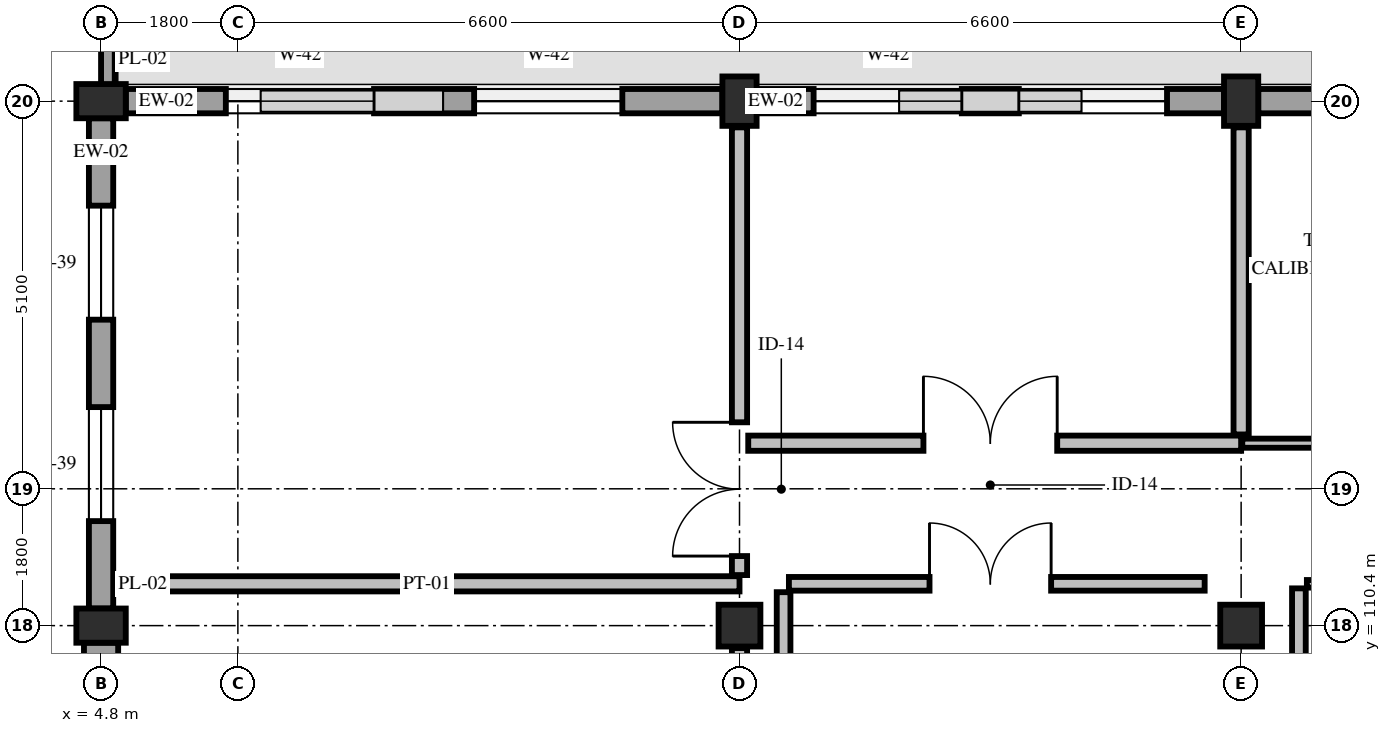
"""IFC4 building model, lengths in metres.
Left out: names, types, materials, properties, quantities, classifications, styles, units other than length and angle.
Written with IfcOpenShell. Run it as: python <this file> out.ifc"""

import sys

from ifc_helpers import new_model, si_unit, direction, frame, frame_2d, origin, origin_2d, place, context, subcontext, project, spatial, rectangle, extrude, element, fill, save


model = new_model("IFC4")
c1 = context("Model", 3, precision=1e-05, world=origin(), true_north=direction((0.0, 1.0)))
c2 = subcontext(c1, "Body", "Model", "MODEL_VIEW")
j1 = project(units=[si_unit("LENGTHUNIT", "METRE"), si_unit("PLANEANGLEUNIT", "RADIAN")], contexts=[c1])
p1 = place(None, origin())
s1 = spatial("IfcSite", under=j1, at=p1, CompositionType="ELEMENT")
p2 = place(p1, origin())
s2 = spatial("IfcBuilding", under=s1, at=p2, CompositionType="ELEMENT")
p3 = place(p2, frame((0.0, 0.0, 46.8)))
s3 = spatial("IfcBuildingStorey", under=s2, at=p3, CompositionType="ELEMENT", Elevation=46.8)
for number, where, z_axis, x_axis in (
    (1, (4.8, 110.4, 0.0), (0.0, 0.0, 1.0), (0.0, 1.0, 0.0)),
    (2, (4.8, 117.3, 0.0), (0.0, 0.0, 1.0), (0.0, 1.0, 0.0)),
):
    element("IfcColumn", number, at=place(p3, frame(where, z_axis=z_axis, x_axis=x_axis)), inside=s3, PredefinedType="PILASTER", context=c2, shape_type="SweptSolid", body=[
        extrude(rectangle(XDim=0.45, YDim=0.65, at=origin_2d()), origin(), (0.0, 0.0, 1.0), 4.2),
    ])
p4 = place(p3, frame((13.2, 110.4, 0.0), z_axis=(0.0, 0.0, 1.0), x_axis=(1.0, 0.0, 0.0)))
e3 = element("IfcColumn", 3, at=p4, inside=s3, PredefinedType="COLUMN", context=c2, shape_type="SweptSolid", body=[
    extrude(rectangle(XDim=0.55, YDim=0.55, at=origin_2d()), origin(), (0.0, 0.0, 1.0), 4.2),
])
p5 = place(p3, frame((13.2, 117.3, 0.0), z_axis=(0.0, 0.0, 1.0), x_axis=(1.0, 0.0, 0.0)))
e4 = element("IfcColumn", 4, at=p5, inside=s3, PredefinedType="PILASTER", context=c2, shape_type="SweptSolid", body=[
    extrude(rectangle(XDim=0.45, YDim=0.65, at=origin_2d()), origin(), (0.0, 0.0, 1.0), 4.2),
])
p6 = place(p3, frame((19.8, 110.4, 0.0), z_axis=(0.0, 0.0, 1.0), x_axis=(1.0, 0.0, 0.0)))
e5 = element("IfcColumn", 5, at=p6, inside=s3, PredefinedType="COLUMN", context=c2, shape_type="SweptSolid", body=[
    extrude(rectangle(XDim=0.55, YDim=0.55, at=origin_2d()), origin(), (0.0, 0.0, 1.0), 4.2),
])
p7 = place(p3, frame((19.8, 117.3, 0.0), z_axis=(0.0, 0.0, 1.0), x_axis=(1.0, 0.0, 0.0)))
e6 = element("IfcColumn", 6, at=p7, inside=s3, PredefinedType="PILASTER", context=c2, shape_type="SweptSolid", body=[
    extrude(rectangle(XDim=0.45, YDim=0.65, at=origin_2d()), origin(), (0.0, 0.0, 1.0), 4.2),
])
p8 = place(p3, frame((4.8, 104.025, 0.0), z_axis=(0.0, 0.0, 1.0), x_axis=(0.0, 1.0, 0.0)))
e7 = element("IfcWall", 7, at=p8, inside=s3, PredefinedType="SOLIDWALL", context=c2, shape_type="SweptSolid", body=[
    extrude(rectangle(XDim=6.15, YDim=0.45, at=frame_2d((3.075, 0.0))), origin(), (0.0, 0.0, 1.0), 3.23),
])
p9 = place(p3, frame((4.8, 110.625, 0.0), z_axis=(0.0, 0.0, 1.0), x_axis=(0.0, 1.0, 0.0)))
e8 = element("IfcWall", 8, at=p9, inside=s3, PredefinedType="STANDARD", context=c2, shape_type="SweptSolid", body=[
    extrude(rectangle(XDim=6.45, YDim=0.32, at=frame_2d((3.225, 0.0))), origin(), (0.0, 0.0, 1.0), 3.23),
])
p10 = place(p9, frame((1.15, 0.0, 0.85)))
e9 = element("IfcOpeningElement", 9, at=p10, cuts=e8, PredefinedType="OPENING", context=c2, shape_type="SweptSolid", body=[
    extrude(rectangle(XDim=1.5, YDim=2.08, at=frame_2d((0.75, 1.04))), frame((0.0, 0.175, 0.0), z_axis=(0.0, -1.0, 0.0), x_axis=(1.0, 0.0, 0.0)), (0.0, 0.0, 1.0), 0.35),
])
p11 = place(p9, frame((3.8, 0.0, 0.85)))
e10 = element("IfcOpeningElement", 10, at=p11, cuts=e8, PredefinedType="OPENING", context=c2, shape_type="SweptSolid", body=[
    extrude(rectangle(XDim=1.5, YDim=2.08, at=frame_2d((0.75, 1.04))), frame((0.0, 0.175, 0.0), z_axis=(0.0, -1.0, 0.0), x_axis=(1.0, 0.0, 0.0)), (0.0, 0.0, 1.0), 0.35),
])
p12 = place(p3, frame((5.125, 117.3, 0.0), z_axis=(0.0, 0.0, 1.0), x_axis=(1.0, 0.0, 0.0)))
e11 = element("IfcWall", 11, at=p12, inside=s3, PredefinedType="STANDARD", context=c2, shape_type="SweptSolid", body=[
    extrude(rectangle(XDim=7.85, YDim=0.32, at=frame_2d((3.925, 0.0))), origin(), (0.0, 0.0, 1.0), 3.33),
])
p13 = place(p12, frame((1.317, 0.0, 0.65)))
e12 = element("IfcOpeningElement", 12, at=p13, cuts=e11, PredefinedType="OPENING", context=c2, shape_type="SweptSolid", body=[
    extrude(rectangle(XDim=1.95, YDim=2.24, at=frame_2d((0.975, 1.12))), frame((0.0, 0.175, 0.0), z_axis=(0.0, -1.0, 0.0), x_axis=(1.0, 0.0, 0.0)), (0.0, 0.0, 1.0), 0.35),
])
p14 = place(p12, frame((4.583, 0.0, 0.65)))
e13 = element("IfcOpeningElement", 13, at=p14, cuts=e11, PredefinedType="OPENING", context=c2, shape_type="SweptSolid", body=[
    extrude(rectangle(XDim=1.95, YDim=2.24, at=frame_2d((0.975, 1.12))), frame((0.0, 0.175, 0.0), z_axis=(0.0, -1.0, 0.0), x_axis=(1.0, 0.0, 0.0)), (0.0, 0.0, 1.0), 0.35),
])
p15 = place(p3, frame((13.425, 117.3, 0.0), z_axis=(0.0, 0.0, 1.0), x_axis=(1.0, 0.0, 0.0)))
e14 = element("IfcWall", 14, at=p15, inside=s3, PredefinedType="STANDARD", context=c2, shape_type="SweptSolid", body=[
    extrude(rectangle(XDim=6.15, YDim=0.32, at=frame_2d((3.075, 0.0))), origin(), (0.0, 0.0, 1.0), 3.33),
])
p16 = place(p15, frame((0.75, 0.0, 0.65)))
e15 = element("IfcOpeningElement", 15, at=p16, cuts=e14, PredefinedType="OPENING", context=c2, shape_type="SweptSolid", body=[
    extrude(rectangle(XDim=1.95, YDim=2.24, at=frame_2d((0.975, 1.12))), frame((0.0, 0.175, 0.0), z_axis=(0.0, -1.0, 0.0), x_axis=(1.0, 0.0, 0.0)), (0.0, 0.0, 1.0), 0.35),
])
p17 = place(p15, frame((3.45, 0.0, 0.65)))
e16 = element("IfcOpeningElement", 16, at=p17, cuts=e14, PredefinedType="OPENING", context=c2, shape_type="SweptSolid", body=[
    extrude(rectangle(XDim=1.95, YDim=2.24, at=frame_2d((0.975, 1.12))), frame((0.0, 0.175, 0.0), z_axis=(0.0, -1.0, 0.0), x_axis=(1.0, 0.0, 0.0)), (0.0, 0.0, 1.0), 0.35),
])
p18 = place(p3, frame((20.025, 117.3, 0.0), z_axis=(0.0, 0.0, 1.0), x_axis=(1.0, 0.0, 0.0)))
e17 = element("IfcWall", 17, at=p18, inside=s3, PredefinedType="STANDARD", context=c2, shape_type="SweptSolid", body=[
    extrude(rectangle(XDim=7.95, YDim=0.32, at=frame_2d((3.975, 0.0))), origin(), (0.0, 0.0, 1.0), 3.33),
])
p19 = place(p18, frame((1.35, 0.0, 0.65)))
e18 = element("IfcOpeningElement", 18, at=p19, cuts=e17, PredefinedType="OPENING", context=c2, shape_type="SweptSolid", body=[
    extrude(rectangle(XDim=1.95, YDim=2.24, at=frame_2d((0.975, 1.12))), frame((0.0, 0.175, 0.0), z_axis=(0.0, -1.0, 0.0), x_axis=(1.0, 0.0, 0.0)), (0.0, 0.0, 1.0), 0.35),
])
p20 = place(p18, frame((4.65, 0.0, 0.65)))
e19 = element("IfcOpeningElement", 19, at=p20, cuts=e17, PredefinedType="OPENING", context=c2, shape_type="SweptSolid", body=[
    extrude(rectangle(XDim=1.95, YDim=2.24, at=frame_2d((0.975, 1.12))), frame((0.0, 0.175, 0.0), z_axis=(0.0, -1.0, 0.0), x_axis=(1.0, 0.0, 0.0)), (0.0, 0.0, 1.0), 0.35),
])
p21 = place(p3, frame((4.89, 117.48, 0.0), z_axis=(0.0, 0.0, 1.0), x_axis=(0.0, 1.0, 0.0)))
e20 = element("IfcWall", 20, at=p21, inside=s3, PredefinedType="PARAPET", context=c2, shape_type="SweptSolid", body=[
    extrude(rectangle(XDim=4.44, YDim=0.18, at=frame_2d((2.22, 0.0))), origin(), (0.0, 0.0, 1.0), 1.12),
])
p22 = place(p3, frame((13.85, 110.95, 0.0), z_axis=(0.0, 0.0, 1.0), x_axis=(1.0, 0.0, 0.0)))
e21 = element("IfcWall", 21, at=p22, inside=s3, PredefinedType="PARTITIONING", context=c2, shape_type="SweptSolid", body=[
    extrude(rectangle(XDim=5.47, YDim=0.18, at=frame_2d((2.735, 0.0))), origin(), (0.0, 0.0, 1.0), 3.9),
])
p23 = place(p22, frame((1.85, 0.0, 0.0)))
e22 = element("IfcOpeningElement", 22, at=p23, cuts=e21, PredefinedType="OPENING", context=c2, shape_type="SweptSolid", body=[
    extrude(rectangle(XDim=1.6, YDim=2.25, at=frame_2d((0.8, 1.125))), frame((0.0, 0.105, 0.0), z_axis=(0.0, -1.0, 0.0), x_axis=(1.0, 0.0, 0.0)), (0.0, 0.0, 1.0), 0.21),
])
p24 = place(p3, frame((13.78, 107.23, 0.0), z_axis=(0.0, 0.0, 1.0), x_axis=(0.0, 1.0, 0.0)))
e23 = element("IfcWall", 23, at=p24, inside=s3, PredefinedType="PARTITIONING", context=c2, shape_type="SweptSolid", body=[
    extrude(rectangle(XDim=3.61, YDim=0.18, at=frame_2d((1.805, 0.0))), origin(), (0.0, 0.0, 1.0), 3.58),
])
p25 = place(p3, frame((20.56, 107.98, 0.0), z_axis=(0.0, 0.0, 1.0), x_axis=(0.0, 1.0, 0.0)))
e24 = element("IfcWall", 24, at=p25, inside=s3, PredefinedType="PARTITIONING", context=c2, shape_type="SweptSolid", body=[
    extrude(rectangle(XDim=2.91, YDim=0.18, at=frame_2d((1.455, 0.0))), origin(), (0.0, 0.0, 1.0), 3.23),
])
p26 = place(p3, frame((20.665, 110.95, 0.0), z_axis=(0.0, 0.0, 1.0), x_axis=(1.0, 0.0, 0.0)))
e25 = element("IfcWall", 25, at=p26, inside=s3, PredefinedType="PARTITIONING", context=c2, shape_type="SweptSolid", body=[
    extrude(rectangle(XDim=2.085, YDim=0.1, at=frame_2d((1.042, 0.0))), origin(), (0.0, 0.0, 1.0), 3.9),
])
p27 = place(p26, frame((0.56, 0.0, 0.0)))
e26 = element("IfcOpeningElement", 26, at=p27, cuts=e25, PredefinedType="OPENING", context=c2, shape_type="SweptSolid", body=[
    extrude(rectangle(XDim=0.95, YDim=2.15, at=frame_2d((0.475, 1.075))), frame((0.0, 0.065, 0.0), z_axis=(0.0, -1.0, 0.0), x_axis=(1.0, 0.0, 0.0)), (0.0, 0.0, 1.0), 0.13),
])
p28 = place(p3, frame((4.975, 110.95, 0.0), z_axis=(0.0, 0.0, 1.0), x_axis=(1.0, 0.0, 0.0)))
e27 = element("IfcWall", 27, at=p28, inside=s3, PredefinedType="PARTITIONING", context=c2, shape_type="SweptSolid", body=[
    extrude(rectangle(XDim=8.225, YDim=0.2, at=frame_2d((4.112, 0.0))), origin(), (0.0, 0.0, 1.0), 3.48),
])
p29 = place(p3, frame((13.2, 104.615, 0.0), z_axis=(0.0, 0.0, 1.0), x_axis=(0.0, 1.0, 0.0)))
e28 = element("IfcWall", 28, at=p29, inside=s3, PredefinedType="PARTITIONING", context=c2, shape_type="SweptSolid", body=[
    extrude(rectangle(XDim=5.49, YDim=0.2, at=frame_2d((2.745, 0.0))), origin(), (0.0, 0.0, 1.0), 3.53),
])
p30 = place(p29, frame((3.405, 0.0, 0.0)))
e29 = element("IfcOpeningElement", 29, at=p30, cuts=e28, PredefinedType="OPENING", context=c2, shape_type="SweptSolid", body=[
    extrude(rectangle(XDim=1.76, YDim=2.35, at=frame_2d((0.88, 1.175))), frame((0.0, 0.115, 0.0), z_axis=(0.0, -1.0, 0.0), x_axis=(1.0, 0.0, 0.0)), (0.0, 0.0, 1.0), 0.23),
])
p31 = place(p3, frame((13.2, 111.065, 0.0), z_axis=(0.0, 0.0, 1.0), x_axis=(0.0, 1.0, 0.0)))
e30 = element("IfcWall", 30, at=p31, inside=s3, PredefinedType="PARTITIONING", context=c2, shape_type="SweptSolid", body=[
    extrude(rectangle(XDim=5.89, YDim=0.2, at=frame_2d((2.945, 0.0))), origin(), (0.0, 0.0, 1.0), 3.53),
])
p32 = place(p31, frame((0.25, 0.0, 0.0)))
e31 = element("IfcOpeningElement", 31, at=p32, cuts=e30, PredefinedType="OPENING", context=c2, shape_type="SweptSolid", body=[
    extrude(rectangle(XDim=1.76, YDim=2.35, at=frame_2d((0.88, 1.175))), frame((0.0, 0.115, 0.0), z_axis=(0.0, -1.0, 0.0), x_axis=(1.0, 0.0, 0.0)), (0.0, 0.0, 1.0), 0.23),
])
p33 = place(p3, frame((13.315, 112.8, 0.0), z_axis=(0.0, 0.0, 1.0), x_axis=(1.0, 0.0, 0.0)))
e32 = element("IfcWall", 32, at=p33, inside=s3, PredefinedType="PARTITIONING", context=c2, shape_type="SweptSolid", body=[
    extrude(rectangle(XDim=6.485, YDim=0.2, at=frame_2d((3.243, 0.0))), origin(), (0.0, 0.0, 1.0), 3.53),
])
p34 = place(p33, frame((2.305, 0.0, 0.0)))
e33 = element("IfcOpeningElement", 33, at=p34, cuts=e32, PredefinedType="OPENING", context=c2, shape_type="SweptSolid", body=[
    extrude(rectangle(XDim=1.76, YDim=2.35, at=frame_2d((0.88, 1.175))), frame((0.0, 0.115, 0.0), z_axis=(0.0, -1.0, 0.0), x_axis=(1.0, 0.0, 0.0)), (0.0, 0.0, 1.0), 0.23),
])
p35 = place(p3, frame((19.8, 112.915, 0.0), z_axis=(0.0, 0.0, 1.0), x_axis=(0.0, 1.0, 0.0)))
e34 = element("IfcWall", 34, at=p35, inside=s3, PredefinedType="PARTITIONING", context=c2, shape_type="SweptSolid", body=[
    extrude(rectangle(XDim=4.04, YDim=0.2, at=frame_2d((2.02, 0.0))), origin(), (0.0, 0.0, 1.0), 3.53),
])
p36 = place(p3, frame((19.815, 112.8, 0.0), z_axis=(0.0, 0.0, 1.0), x_axis=(1.0, 0.0, 0.0)))
e35 = element("IfcWall", 35, at=p36, inside=s3, PredefinedType="PARTITIONING", context=c2, shape_type="SweptSolid", body=[
    extrude(rectangle(XDim=7.785, YDim=0.12, at=frame_2d((3.893, 0.0))), origin(), (0.0, 0.0, 1.0), 3.53),
])
p37 = place(p36, frame((3.195, 0.0, 0.0)))
e36 = element("IfcOpeningElement", 36, at=p37, cuts=e35, PredefinedType="OPENING", context=c2, shape_type="SweptSolid", body=[
    extrude(rectangle(XDim=1.38, YDim=2.25, at=frame_2d((0.69, 1.125))), frame((0.0, 0.075, 0.0), z_axis=(0.0, -1.0, 0.0), x_axis=(1.0, 0.0, 0.0)), (0.0, 0.0, 1.0), 0.15),
])
p38 = place(p10, origin())
e37 = element("IfcWindow", 37, at=p38, inside=s3, PartitioningType="SINGLE_PANEL", PredefinedType="WINDOW", context=c2, shape_type="SweptSolid", body=[
    extrude(rectangle(XDim=1.5, YDim=2.08, at=frame_2d((0.75, 1.04))), frame((0.0, 0.03, 0.0), z_axis=(0.0, -1.0, 0.0), x_axis=(1.0, 0.0, 0.0)), (0.0, 0.0, 1.0), 0.06),
])
fill(e9, e37)
p39 = place(p11, origin())
e38 = element("IfcWindow", 38, at=p39, inside=s3, PartitioningType="SINGLE_PANEL", PredefinedType="WINDOW", context=c2, shape_type="SweptSolid", body=[
    extrude(rectangle(XDim=1.5, YDim=2.08, at=frame_2d((0.75, 1.04))), frame((0.0, 0.03, 0.0), z_axis=(0.0, -1.0, 0.0), x_axis=(1.0, 0.0, 0.0)), (0.0, 0.0, 1.0), 0.06),
])
fill(e10, e38)
p40 = place(p13, origin())
e39 = element("IfcWindow", 39, at=p40, inside=s3, PartitioningType="DOUBLE_PANEL_VERTICAL", PredefinedType="WINDOW", context=c2, shape_type="SweptSolid", body=[
    extrude(rectangle(XDim=1.95, YDim=2.24, at=frame_2d((0.975, 1.12))), frame((0.0, 0.03, 0.0), z_axis=(0.0, -1.0, 0.0), x_axis=(1.0, 0.0, 0.0)), (0.0, 0.0, 1.0), 0.06),
])
fill(e12, e39)
p41 = place(p14, origin())
e40 = element("IfcWindow", 40, at=p41, inside=s3, PartitioningType="DOUBLE_PANEL_VERTICAL", PredefinedType="WINDOW", context=c2, shape_type="SweptSolid", body=[
    extrude(rectangle(XDim=1.95, YDim=2.24, at=frame_2d((0.975, 1.12))), frame((0.0, 0.03, 0.0), z_axis=(0.0, -1.0, 0.0), x_axis=(1.0, 0.0, 0.0)), (0.0, 0.0, 1.0), 0.06),
])
fill(e13, e40)
p42 = place(p16, origin())
e41 = element("IfcWindow", 41, at=p42, inside=s3, PartitioningType="DOUBLE_PANEL_VERTICAL", PredefinedType="WINDOW", context=c2, shape_type="SweptSolid", body=[
    extrude(rectangle(XDim=1.95, YDim=2.24, at=frame_2d((0.975, 1.12))), frame((0.0, 0.03, 0.0), z_axis=(0.0, -1.0, 0.0), x_axis=(1.0, 0.0, 0.0)), (0.0, 0.0, 1.0), 0.06),
])
fill(e15, e41)
p43 = place(p17, origin())
e42 = element("IfcWindow", 42, at=p43, inside=s3, PartitioningType="DOUBLE_PANEL_VERTICAL", PredefinedType="WINDOW", context=c2, shape_type="SweptSolid", body=[
    extrude(rectangle(XDim=1.95, YDim=2.24, at=frame_2d((0.975, 1.12))), frame((0.0, 0.03, 0.0), z_axis=(0.0, -1.0, 0.0), x_axis=(1.0, 0.0, 0.0)), (0.0, 0.0, 1.0), 0.06),
])
fill(e16, e42)
p44 = place(p23, origin())
e43 = element("IfcDoor", 43, at=p44, inside=s3, OperationType="DOUBLE_DOOR_SINGLE_SWING", PredefinedType="DOOR", context=c2, shape_type="SweptSolid", body=[
    extrude(rectangle(XDim=1.6, YDim=2.25, at=frame_2d((0.8, 1.125))), frame((0.0, 0.025, 0.0), z_axis=(0.0, -1.0, 0.0), x_axis=(1.0, 0.0, 0.0)), (0.0, 0.0, 1.0), 0.05),
])
fill(e22, e43)
p45 = place(p32, origin())
e44 = element("IfcDoor", 44, at=p45, inside=s3, OperationType="DOUBLE_DOOR_SINGLE_SWING", PredefinedType="DOOR", context=c2, shape_type="SweptSolid", body=[
    extrude(rectangle(XDim=1.76, YDim=2.35, at=frame_2d((0.88, 1.175))), frame((0.0, 0.025, 0.0), z_axis=(0.0, -1.0, 0.0), x_axis=(1.0, 0.0, 0.0)), (0.0, 0.0, 1.0), 0.05),
])
fill(e31, e44)
p46 = place(p34, origin())
e45 = element("IfcDoor", 45, at=p46, inside=s3, OperationType="DOUBLE_DOOR_SINGLE_SWING", PredefinedType="DOOR", context=c2, shape_type="SweptSolid", body=[
    extrude(rectangle(XDim=1.76, YDim=2.35, at=frame_2d((0.88, 1.175))), frame((0.0, 0.025, 0.0), z_axis=(0.0, -1.0, 0.0), x_axis=(1.0, 0.0, 0.0)), (0.0, 0.0, 1.0), 0.05),
])
fill(e33, e45)
save(model, sys.argv[1])
